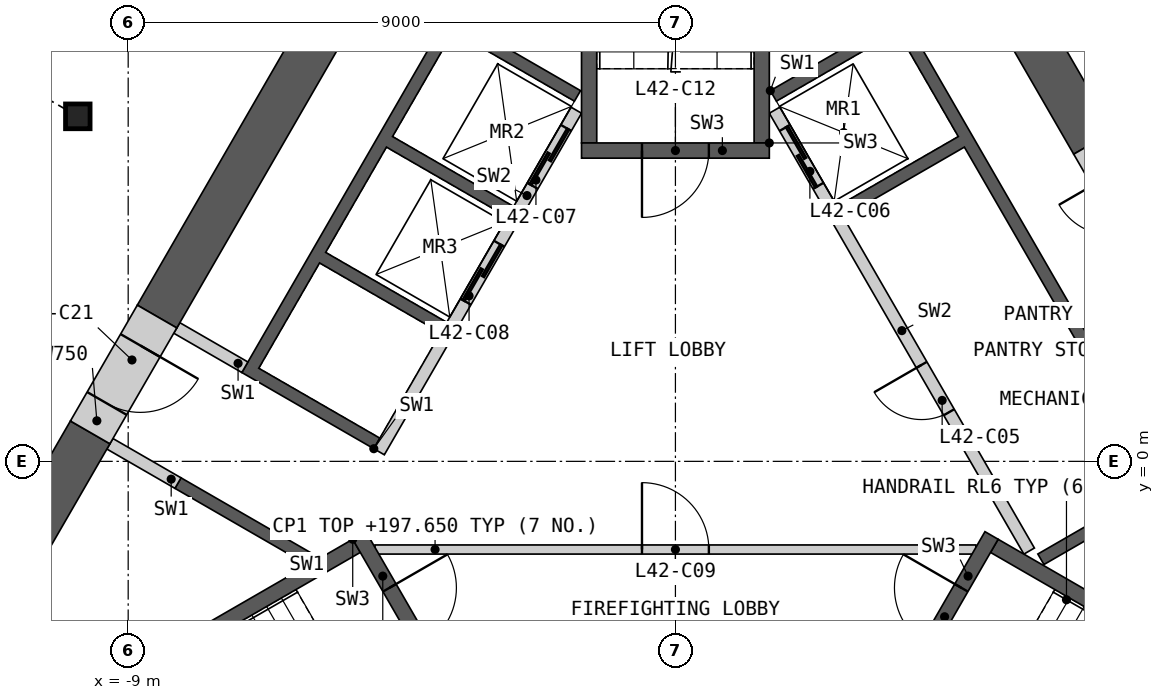
"""IFC4 building model, lengths in metres.
Left out: names, types, materials, properties, quantities, classifications, styles, units other than length and angle.
Written with IfcOpenShell. Run it as: python <this file> out.ifc"""

import sys

from ifc_helpers import new_model, si_unit, direction, frame, frame_2d, origin, origin_2d, place, context, subcontext, project, spatial, polyline, rectangle, i_section, outline, extrude, element, fill, save


model = new_model("IFC4")
c1 = context("Model", 3, precision=1e-05, world=origin(), true_north=direction((0.0, 1.0)))
c2 = subcontext(c1, "Body", "Model", "MODEL_VIEW")
j1 = project(units=[si_unit("LENGTHUNIT", "METRE"), si_unit("PLANEANGLEUNIT", "RADIAN")], contexts=[c1])
p1 = place(None, origin())
s1 = spatial("IfcSite", under=j1, at=p1, CompositionType="ELEMENT")
p2 = place(p1, origin())
s2 = spatial("IfcBuilding", under=s1, at=p2, CompositionType="ELEMENT")
p3 = place(p2, frame((0.0, 0.0, 194.4)))
s3 = spatial("IfcBuildingStorey", under=s2, at=p3, CompositionType="ELEMENT", Elevation=194.4)
p4 = place(p3, frame((-9.828, 5.675, 0.0), z_axis=(0.0, 0.0, 1.0), x_axis=(1.0, 0.0, 0.0)))
e1 = element("IfcColumn", 1, at=p4, inside=s3, PredefinedType="COLUMN", context=c2, shape_type="SweptSolid", body=[
    extrude(i_section(OverallWidth=0.404, OverallDepth=0.407, WebThickness=0.027, FlangeThickness=0.044, at=origin_2d()), origin(), (0.0, 0.0, 1.0), 3.6),
])
p5 = place(p3, origin())
e2 = element("IfcWall", 2, at=p5, inside=s3, PredefinedType="SHEAR", context=c2, shape_type="SweptSolid", body=[
    extrude(outline(polyline([(1.561, 6.097), (3.731, 7.35), (8.231, -0.444), (6.061, -1.697), (5.96, -1.524), (7.952, -0.374), (4.752, 5.169), (2.76, 4.019), (2.66, 4.192), (4.652, 5.342), (3.652, 7.074), (1.66, 5.924), (1.561, 6.097)])), origin(), (0.0, 0.0, 1.0), 3.25),
])
p6 = place(p3, frame((5.817, -1.476, 0.0), z_axis=(0.0, 0.0, 1.0), x_axis=(-0.500002616675, 0.866023893041, 0.0)))
e3 = element("IfcWall", 3, at=p6, inside=s3, PredefinedType="SOLIDWALL", context=c2, shape_type="SweptSolid", body=[
    extrude(rectangle(XDim=8.373, YDim=0.2, at=frame_2d((4.187, 0.0))), origin(), (0.0, 0.0, 1.0), 3.25),
])
p7 = place(p6, frame((2.637, 0.0, 0.0)))
e4 = element("IfcOpeningElement", 4, at=p7, cuts=e3, PredefinedType="OPENING", context=c2, shape_type="SweptSolid", body=[
    extrude(rectangle(XDim=0.9, YDim=2.1, at=frame_2d((0.45, 1.05))), frame((0.0, 0.11, 0.0), z_axis=(0.0, -1.0, 0.0), x_axis=(1.0, 0.0, 0.0)), (0.0, 0.0, 1.0), 0.22),
])
p8 = place(p6, frame((6.937, 0.0, 0.0)))
e5 = element("IfcOpeningElement", 5, at=p8, cuts=e3, PredefinedType="OPENING", context=c2, shape_type="SweptSolid", body=[
    extrude(rectangle(XDim=1.1, YDim=2.1, at=frame_2d((0.55, 1.05))), frame((0.0, 0.11, 0.0), z_axis=(0.0, -1.0, 0.0), x_axis=(1.0, 0.0, 0.0)), (0.0, 0.0, 1.0), 0.22),
])
p9 = place(p3, origin())
e6 = element("IfcWall", 6, at=p9, inside=s3, PredefinedType="SHEAR", context=c2, shape_type="SweptSolid", body=[
    extrude(outline(polyline([(-6.061, -1.697), (-8.231, -0.444), (-8.131, -0.271), (-5.96, -1.524), (-6.061, -1.697)])), origin(), (0.0, 0.0, 1.0), 3.25),
])
p10 = place(p3, origin())
e7 = element("IfcWall", 7, at=p10, inside=s3, PredefinedType="SHEAR", context=c2, shape_type="SweptSolid", body=[
    extrude(outline(polyline([(-4.96, 0.208), (-7.131, 1.461), (-3.731, 7.35), (-1.561, 6.097), (-1.66, 5.924), (-3.652, 7.074), (-4.652, 5.342), (-2.66, 4.192), (-2.76, 4.019), (-4.752, 5.169), (-5.752, 3.437), (-3.76, 2.287), (-3.861, 2.113), (-5.852, 3.263), (-6.852, 1.531), (-4.861, 0.381), (-4.96, 0.208)])), origin(), (0.0, 0.0, 1.0), 3.25),
])
p11 = place(p3, frame((-1.631, 5.776, 0.0), z_axis=(0.0, 0.0, 1.0), x_axis=(-0.499992876559, -0.866029516466, 0.0)))
e8 = element("IfcWall", 8, at=p11, inside=s3, PredefinedType="SOLIDWALL", context=c2, shape_type="SweptSolid", body=[
    extrude(rectangle(XDim=6.486, YDim=0.2, at=frame_2d((3.243, 0.0))), origin(), (0.0, 0.0, 1.0), 3.25),
])
p12 = place(p11, frame((0.337, 0.0, 0.0)))
e9 = element("IfcOpeningElement", 9, at=p12, cuts=e8, PredefinedType="OPENING", context=c2, shape_type="SweptSolid", body=[
    extrude(rectangle(XDim=1.1, YDim=2.1, at=frame_2d((0.55, 1.05))), frame((0.0, 0.11, 0.0), z_axis=(0.0, -1.0, 0.0), x_axis=(1.0, 0.0, 0.0)), (0.0, 0.0, 1.0), 0.22),
])
p13 = place(p11, frame((2.537, 0.0, 0.0)))
e10 = element("IfcOpeningElement", 10, at=p13, cuts=e8, PredefinedType="OPENING", context=c2, shape_type="SweptSolid", body=[
    extrude(rectangle(XDim=1.1, YDim=2.1, at=frame_2d((0.55, 1.05))), frame((0.0, 0.11, 0.0), z_axis=(0.0, -1.0, 0.0), x_axis=(1.0, 0.0, 0.0)), (0.0, 0.0, 1.0), 0.22),
])
for number, where, z_axis, x_axis in (
    (11, (-7.081, 1.548, 0.0), (0.0, 0.0, 1.0), (-0.866, 0.5, 0.0)),
    (12, (-8.181, -0.357, 0.0), (0.0, 0.0, 1.0), (-0.866, 0.5, 0.0)),
):
    element("IfcWall", number, at=place(p3, frame(where, z_axis=z_axis, x_axis=x_axis)), inside=s3, PredefinedType="SHEAR", context=c2, shape_type="SweptSolid", body=[
        extrude(rectangle(XDim=1.293, YDim=0.2, at=frame_2d((0.646, 0.0))), origin(), (0.0, 0.0, 1.0), 3.25),
    ])
p14 = place(p3, frame((-4.941, -1.45, 0.0), z_axis=(0.0, 0.0, 1.0), x_axis=(1.0, 0.0, 0.0)))
e13 = element("IfcWall", 13, at=p14, inside=s3, PredefinedType="PARTITIONING", context=c2, shape_type="SweptSolid", body=[
    extrude(rectangle(XDim=9.882, YDim=0.15, at=frame_2d((4.941, 0.0))), origin(), (0.0, 0.0, 1.0), 3.25),
])
p15 = place(p14, frame((4.391, 0.0, 0.0)))
e14 = element("IfcOpeningElement", 14, at=p15, cuts=e13, PredefinedType="OPENING", context=c2, shape_type="SweptSolid", body=[
    extrude(rectangle(XDim=1.1, YDim=2.1, at=frame_2d((0.55, 1.05))), frame((0.0, 0.085, 0.0), z_axis=(0.0, -1.0, 0.0), x_axis=(1.0, 0.0, 0.0)), (0.0, 0.0, 1.0), 0.17),
])
p16 = place(p3, origin())
e15 = element("IfcWall", 15, at=p16, inside=s3, PredefinedType="SHEAR", context=c2, shape_type="SweptSolid", body=[
    extrude(outline(polyline([(-5.307, -1.281), (-10.374, -4.206), (-10.032, -4.298), (-5.182, -1.498), (-5.307, -1.281)])), origin(), (0.0, 0.0, 1.0), 3.25),
])
p17 = place(p3, frame((-5.199, -1.219, 0.0), z_axis=(0.0, 0.0, 1.0), x_axis=(0.499982516597, -0.866035497597, 0.0)))
e16 = element("IfcWall", 16, at=p17, inside=s3, PredefinedType="SHEAR", context=c2, shape_type="SweptSolid", body=[
    extrude(rectangle(XDim=3.088, YDim=0.25, at=frame_2d((1.544, 0.0))), origin(), (0.0, 0.0, 1.0), 3.25),
])
p18 = place(p17, frame((0.994, 0.0, 0.0)))
e17 = element("IfcOpeningElement", 17, at=p18, cuts=e16, PredefinedType="OPENING", context=c2, shape_type="SweptSolid", body=[
    extrude(rectangle(XDim=1.1, YDim=2.1, at=frame_2d((0.55, 1.05))), frame((0.0, 0.135, 0.0), z_axis=(0.0, -1.0, 0.0), x_axis=(1.0, 0.0, 0.0)), (0.0, 0.0, 1.0), 0.27),
])
p19 = place(p3, origin())
e18 = element("IfcWall", 18, at=p19, inside=s3, PredefinedType="SHEAR", context=c2, shape_type="SweptSolid", body=[
    extrude(outline(polyline([(10.032, -4.298), (10.374, -4.206), (5.307, -1.281), (5.182, -1.498), (10.032, -4.298)])), origin(), (0.0, 0.0, 1.0), 3.25),
])
p20 = place(p3, frame((3.655, -3.893, 0.0), z_axis=(0.0, 0.0, 1.0), x_axis=(0.499982516597, 0.866035497597, 0.0)))
e19 = element("IfcWall", 19, at=p20, inside=s3, PredefinedType="SHEAR", context=c2, shape_type="SweptSolid", body=[
    extrude(rectangle(XDim=3.088, YDim=0.25, at=frame_2d((1.544, 0.0))), origin(), (0.0, 0.0, 1.0), 3.25),
])
p21 = place(p20, frame((0.994, 0.0, 0.0)))
e20 = element("IfcOpeningElement", 20, at=p21, cuts=e19, PredefinedType="OPENING", context=c2, shape_type="SweptSolid", body=[
    extrude(rectangle(XDim=1.1, YDim=2.1, at=frame_2d((0.55, 1.05))), frame((0.0, 0.135, 0.0), z_axis=(0.0, -1.0, 0.0), x_axis=(1.0, 0.0, 0.0)), (0.0, 0.0, 1.0), 0.27),
])
p22 = place(p3, origin())
e21 = element("IfcWall", 21, at=p22, inside=s3, PredefinedType="SHEAR", context=c2, shape_type="SweptSolid", body=[
    extrude(outline(polyline([(1.544, 5.237), (1.544, 11.087), (1.294, 10.837), (1.294, 5.237), (1.544, 5.237)])), origin(), (0.0, 0.0, 1.0), 3.25),
])
p23 = place(p3, origin())
e22 = element("IfcWall", 22, at=p23, inside=s3, PredefinedType="SHEAR", context=c2, shape_type="SweptSolid", body=[
    extrude(outline(polyline([(-1.294, 10.837), (-1.544, 11.087), (-1.544, 5.237), (-1.294, 5.237), (-1.294, 10.837)])), origin(), (0.0, 0.0, 1.0), 3.25),
])
p24 = place(p3, frame((1.544, 5.112, 0.0), z_axis=(0.0, 0.0, 1.0), x_axis=(-1.0, 0.0, 0.0)))
e23 = element("IfcWall", 23, at=p24, inside=s3, PredefinedType="SHEAR", context=c2, shape_type="SweptSolid", body=[
    extrude(rectangle(XDim=3.088, YDim=0.25, at=frame_2d((1.544, 0.0))), origin(), (0.0, 0.0, 1.0), 3.25),
])
p25 = place(p24, frame((0.994, 0.0, 0.0)))
e24 = element("IfcOpeningElement", 24, at=p25, cuts=e23, PredefinedType="OPENING", context=c2, shape_type="SweptSolid", body=[
    extrude(rectangle(XDim=1.1, YDim=2.1, at=frame_2d((0.55, 1.05))), frame((0.0, 0.135, 0.0), z_axis=(0.0, -1.0, 0.0), x_axis=(1.0, 0.0, 0.0)), (0.0, 0.0, 1.0), 0.27),
])
p26 = place(p3, frame((6.875, 5.24, 0.0), z_axis=(0.0, 0.0, 1.0), x_axis=(-0.499997217876, 0.866027010039, 0.0)))
e25 = element("IfcWall", 25, at=p26, inside=s3, PredefinedType="SHEAR", context=c2, shape_type="SweptSolid", body=[
    extrude(rectangle(XDim=13.101, YDim=0.75, at=frame_2d((6.551, 0.0))), origin(), (0.0, 0.0, 1.0), 3.25),
])
p27 = place(p3, frame((-4.95, 8.574, 0.0), z_axis=(0.0, 0.0, 1.0), x_axis=(-0.499987463267, -0.866032641749, 0.0)))
e26 = element("IfcWall", 26, at=p27, inside=s3, PredefinedType="SHEAR", context=c2, shape_type="SweptSolid", body=[
    extrude(rectangle(XDim=7.151, YDim=0.75, at=frame_2d((3.575, 0.0))), origin(), (0.0, 0.0, 1.0), 3.25),
])
p28 = place(p3, frame((-9.625, 0.477, 0.0), z_axis=(0.0, 0.0, 1.0), x_axis=(-0.499951145694, -0.866053607994, 0.0)))
e27 = element("IfcWall", 27, at=p28, inside=s3, PredefinedType="SHEAR", context=c2, shape_type="SweptSolid", body=[
    extrude(rectangle(XDim=3.851, YDim=0.75, at=frame_2d((1.925, 0.0))), origin(), (0.0, 0.0, 1.0), 3.25),
])
p29 = place(p3, frame((7.975, 3.334, 0.0), z_axis=(0.0, 0.0, 1.0), x_axis=(-0.500077893725, 0.86598042715, 0.0)))
e28 = element("IfcWall", 28, at=p29, inside=s3, PredefinedType="SHEAR", context=c2, shape_type="SweptSolid", body=[
    extrude(rectangle(XDim=2.2, YDim=0.75, at=frame_2d((1.1, 0.0))), origin(), (0.0, 0.0, 1.0), 3.25),
])
p30 = place(p29, frame((0.6, 0.0, 0.0)))
e29 = element("IfcOpeningElement", 29, at=p30, cuts=e28, PredefinedType="OPENING", context=c2, shape_type="SweptSolid", body=[
    extrude(rectangle(XDim=1.0, YDim=2.1, at=frame_2d((0.5, 1.05))), frame((0.0, 0.385, 0.0), z_axis=(0.0, -1.0, 0.0), x_axis=(1.0, 0.0, 0.0)), (0.0, 0.0, 1.0), 0.77),
])
p31 = place(p3, frame((-8.525, 2.382, 0.0), z_axis=(0.0, 0.0, 1.0), x_axis=(-0.500077893725, -0.86598042715, 0.0)))
e30 = element("IfcWall", 30, at=p31, inside=s3, PredefinedType="SHEAR", context=c2, shape_type="SweptSolid", body=[
    extrude(rectangle(XDim=2.2, YDim=0.75, at=frame_2d((1.1, 0.0))), origin(), (0.0, 0.0, 1.0), 3.25),
])
p32 = place(p31, frame((0.55, 0.0, 0.0)))
e31 = element("IfcOpeningElement", 31, at=p32, cuts=e30, PredefinedType="OPENING", context=c2, shape_type="SweptSolid", body=[
    extrude(rectangle(XDim=1.1, YDim=2.1, at=frame_2d((0.55, 1.05))), frame((0.0, 0.385, 0.0), z_axis=(0.0, -1.0, 0.0), x_axis=(1.0, 0.0, 0.0)), (0.0, 0.0, 1.0), 0.77),
])
p33 = place(p3, frame((-19.476, -5.035, 0.0), z_axis=(0.0, 0.0, 1.0), x_axis=(0.500000757641, 0.86602496636, 0.0)))
e32 = element("IfcWall", 32, at=p33, inside=s3, PredefinedType="PARTITIONING", context=c2, shape_type="SweptSolid", body=[
    extrude(rectangle(XDim=28.198, YDim=0.2, at=frame_2d((14.099, 0.0))), origin(), (0.0, 0.0, 1.0), 3.25),
])
p34 = place(p33, frame((25.796, 0.0, 0.0)))
e33 = element("IfcOpeningElement", 33, at=p34, cuts=e32, PredefinedType="OPENING", context=c2, shape_type="SweptSolid", body=[
    extrude(rectangle(XDim=0.95, YDim=2.1, at=frame_2d((0.475, 1.05))), frame((0.0, 0.11, 0.0), z_axis=(0.0, -1.0, 0.0), x_axis=(1.0, 0.0, 0.0)), (0.0, 0.0, 1.0), 0.22),
])
p35 = place(p33, frame((14.603, 0.0, 0.0)))
e34 = element("IfcOpeningElement", 34, at=p35, cuts=e32, PredefinedType="OPENING", context=c2, shape_type="SweptSolid", body=[
    extrude(rectangle(XDim=1.1, YDim=2.1, at=frame_2d((0.55, 1.05))), frame((0.0, 0.11, 0.0), z_axis=(0.0, -1.0, 0.0), x_axis=(1.0, 0.0, 0.0)), (0.0, 0.0, 1.0), 0.22),
])
p36 = place(p33, frame((11.993, 0.0, 0.0)))
e35 = element("IfcOpeningElement", 35, at=p36, cuts=e32, PredefinedType="OPENING", context=c2, shape_type="SweptSolid", body=[
    extrude(rectangle(XDim=1.1, YDim=2.1, at=frame_2d((0.55, 1.05))), frame((0.0, 0.11, 0.0), z_axis=(0.0, -1.0, 0.0), x_axis=(1.0, 0.0, 0.0)), (0.0, 0.0, 1.0), 0.22),
])
p37 = place(p33, frame((1.452, 0.0, 0.0)))
e36 = element("IfcOpeningElement", 36, at=p37, cuts=e32, PredefinedType="OPENING", context=c2, shape_type="SweptSolid", body=[
    extrude(rectangle(XDim=0.95, YDim=2.1, at=frame_2d((0.475, 1.05))), frame((0.0, 0.11, 0.0), z_axis=(0.0, -1.0, 0.0), x_axis=(1.0, 0.0, 0.0)), (0.0, 0.0, 1.0), 0.22),
])
p38 = place(p3, frame((5.038, 13.972, 0.0), z_axis=(0.0, 0.0, 1.0), x_axis=(0.50000393355, -0.866023132736, 0.0)))
e37 = element("IfcWall", 37, at=p38, inside=s3, PredefinedType="PARTITIONING", context=c2, shape_type="SweptSolid", body=[
    extrude(rectangle(XDim=9.335, YDim=0.2, at=frame_2d((4.667, 0.0))), origin(), (0.0, 0.0, 1.0), 3.25),
])
p39 = place(p38, frame((5.979, 0.0, 0.0)))
e38 = element("IfcOpeningElement", 38, at=p39, cuts=e37, PredefinedType="OPENING", context=c2, shape_type="SweptSolid", body=[
    extrude(rectangle(XDim=1.8, YDim=2.1, at=frame_2d((0.9, 1.05))), frame((0.0, 0.11, 0.0), z_axis=(0.0, -1.0, 0.0), x_axis=(1.0, 0.0, 0.0)), (0.0, 0.0, 1.0), 0.22),
])
p40 = place(p38, frame((3.163, 0.0, 0.0)))
e39 = element("IfcOpeningElement", 39, at=p40, cuts=e37, PredefinedType="OPENING", context=c2, shape_type="SweptSolid", body=[
    extrude(rectangle(XDim=1.0, YDim=2.1, at=frame_2d((0.5, 1.05))), frame((0.0, 0.11, 0.0), z_axis=(0.0, -1.0, 0.0), x_axis=(1.0, 0.0, 0.0)), (0.0, 0.0, 1.0), 0.22),
])
p41 = place(p7, origin())
e40 = element("IfcDoor", 40, at=p41, inside=s3, OperationType="SINGLE_SWING_RIGHT", PredefinedType="DOOR", context=c2, shape_type="SweptSolid", body=[
    extrude(rectangle(XDim=0.9, YDim=2.1, at=frame_2d((0.45, 1.05))), frame((0.0, 0.025, 0.0), z_axis=(0.0, -1.0, 0.0), x_axis=(1.0, 0.0, 0.0)), (0.0, 0.0, 1.0), 0.05),
])
fill(e4, e40)
p42 = place(p8, origin())
e41 = element("IfcDoor", 41, at=p42, inside=s3, OperationType="SLIDING_TO_LEFT", PredefinedType="DOOR", context=c2, shape_type="SweptSolid", body=[
    extrude(rectangle(XDim=1.1, YDim=2.1, at=frame_2d((0.55, 1.05))), frame((0.0, 0.025, 0.0), z_axis=(0.0, -1.0, 0.0), x_axis=(1.0, 0.0, 0.0)), (0.0, 0.0, 1.0), 0.05),
])
fill(e5, e41)
p43 = place(p12, origin())
e42 = element("IfcDoor", 42, at=p43, inside=s3, OperationType="SLIDING_TO_LEFT", PredefinedType="DOOR", context=c2, shape_type="SweptSolid", body=[
    extrude(rectangle(XDim=1.1, YDim=2.1, at=frame_2d((0.55, 1.05))), frame((0.0, 0.025, 0.0), z_axis=(0.0, -1.0, 0.0), x_axis=(1.0, 0.0, 0.0)), (0.0, 0.0, 1.0), 0.05),
])
fill(e9, e42)
p44 = place(p13, origin())
e43 = element("IfcDoor", 43, at=p44, inside=s3, OperationType="SLIDING_TO_LEFT", PredefinedType="DOOR", context=c2, shape_type="SweptSolid", body=[
    extrude(rectangle(XDim=1.1, YDim=2.1, at=frame_2d((0.55, 1.05))), frame((0.0, 0.025, 0.0), z_axis=(0.0, -1.0, 0.0), x_axis=(1.0, 0.0, 0.0)), (0.0, 0.0, 1.0), 0.05),
])
fill(e10, e43)
p45 = place(p15, origin())
e44 = element("IfcDoor", 44, at=p45, inside=s3, OperationType="SINGLE_SWING_LEFT", PredefinedType="DOOR", context=c2, shape_type="SweptSolid", body=[
    extrude(rectangle(XDim=1.1, YDim=2.1, at=frame_2d((0.55, 1.05))), frame((0.0, 0.025, 0.0), z_axis=(0.0, -1.0, 0.0), x_axis=(1.0, 0.0, 0.0)), (0.0, 0.0, 1.0), 0.05),
])
fill(e14, e44)
p46 = place(p18, origin())
e45 = element("IfcDoor", 45, at=p46, inside=s3, OperationType="SINGLE_SWING_LEFT", PredefinedType="DOOR", context=c2, shape_type="SweptSolid", body=[
    extrude(rectangle(XDim=1.1, YDim=2.1, at=frame_2d((0.55, 1.05))), frame((0.0, 0.025, 0.0), z_axis=(0.0, -1.0, 0.0), x_axis=(1.0, 0.0, 0.0)), (0.0, 0.0, 1.0), 0.05),
])
fill(e17, e45)
p47 = place(p21, origin())
e46 = element("IfcDoor", 46, at=p47, inside=s3, OperationType="SINGLE_SWING_RIGHT", PredefinedType="DOOR", context=c2, shape_type="SweptSolid", body=[
    extrude(rectangle(XDim=1.1, YDim=2.1, at=frame_2d((0.55, 1.05))), frame((0.0, 0.025, 0.0), z_axis=(0.0, -1.0, 0.0), x_axis=(1.0, 0.0, 0.0)), (0.0, 0.0, 1.0), 0.05),
])
fill(e20, e46)
p48 = place(p25, origin())
e47 = element("IfcDoor", 47, at=p48, inside=s3, OperationType="SINGLE_SWING_RIGHT", PredefinedType="DOOR", context=c2, shape_type="SweptSolid", body=[
    extrude(rectangle(XDim=1.1, YDim=2.1, at=frame_2d((0.55, 1.05))), frame((0.0, 0.025, 0.0), z_axis=(0.0, -1.0, 0.0), x_axis=(1.0, 0.0, 0.0)), (0.0, 0.0, 1.0), 0.05),
])
fill(e24, e47)
p49 = place(p32, origin())
e48 = element("IfcDoor", 48, at=p49, inside=s3, OperationType="SINGLE_SWING_LEFT", PredefinedType="DOOR", context=c2, shape_type="SweptSolid", body=[
    extrude(rectangle(XDim=1.1, YDim=2.1, at=frame_2d((0.55, 1.05))), frame((0.0, 0.13, 0.0), z_axis=(0.0, -1.0, 0.0), x_axis=(1.0, 0.0, 0.0)), (0.0, 0.0, 1.0), 0.05),
])
fill(e31, e48)
save(model, sys.argv[1])
